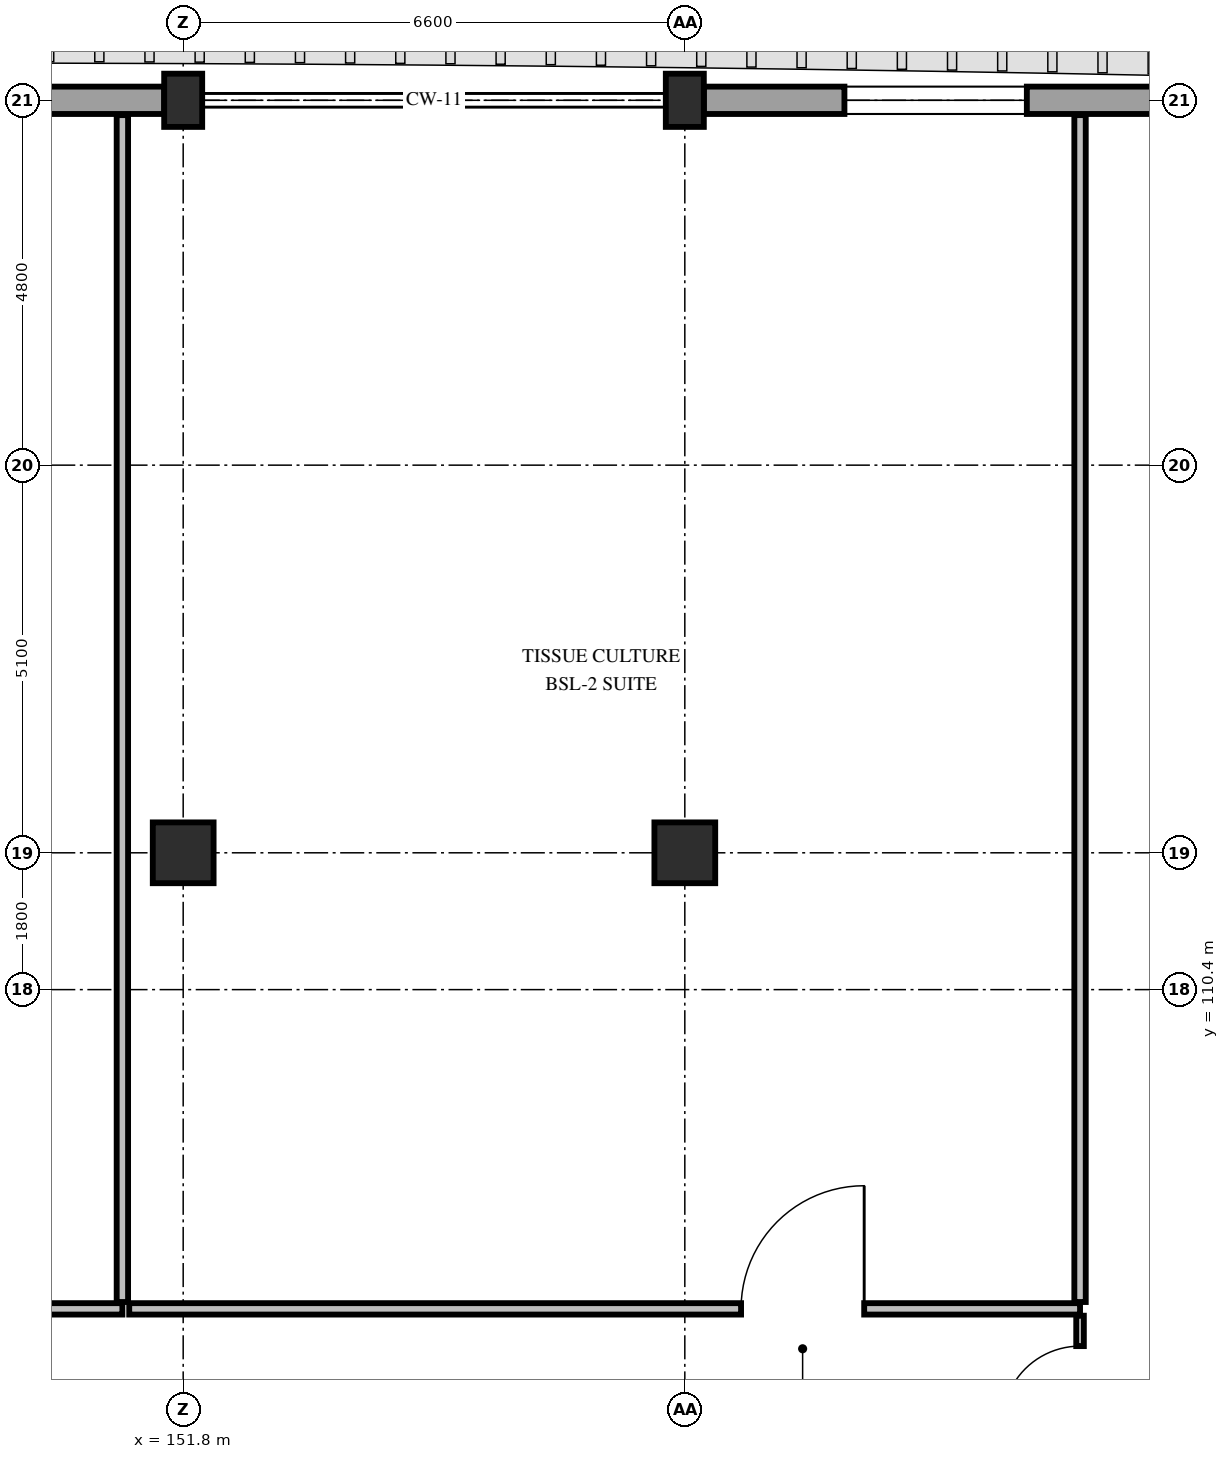
"""IFC4 building model, lengths in metres.
Left out: names, types, materials, properties, quantities, classifications, styles, units other than length and angle.
Written with IfcOpenShell. Run it as: python <this file> out.ifc"""

import sys

from ifc_helpers import new_model, si_unit, direction, frame, frame_2d, origin, origin_2d, place, context, subcontext, project, spatial, rectangle, extrude, element, fill, save


model = new_model("IFC4")
c1 = context("Model", 3, precision=1e-05, world=origin(), true_north=direction((0.0, 1.0)))
c2 = subcontext(c1, "Body", "Model", "MODEL_VIEW")
j1 = project(units=[si_unit("LENGTHUNIT", "METRE"), si_unit("PLANEANGLEUNIT", "RADIAN")], contexts=[c1])
p1 = place(None, origin())
s1 = spatial("IfcSite", under=j1, at=p1, CompositionType="ELEMENT")
p2 = place(p1, origin())
s2 = spatial("IfcBuilding", under=s1, at=p2, CompositionType="ELEMENT")
p3 = place(p2, frame((0.0, 0.0, 5.4)))
s3 = spatial("IfcBuildingStorey", under=s2, at=p3, CompositionType="ELEMENT", Elevation=5.4)
p4 = place(p3, frame((151.8, 112.2, 0.0), z_axis=(0.0, 0.0, 1.0), x_axis=(1.0, 0.0, 0.0)))
e1 = element("IfcColumn", 1, at=p4, inside=s3, PredefinedType="COLUMN", context=c2, shape_type="SweptSolid", body=[
    extrude(rectangle(XDim=0.8, YDim=0.8, at=origin_2d()), origin(), (0.0, 0.0, 1.0), 4.8),
])
p5 = place(p3, frame((151.8, 122.1, 0.0), z_axis=(0.0, 0.0, 1.0), x_axis=(1.0, 0.0, 0.0)))
e2 = element("IfcColumn", 2, at=p5, inside=s3, PredefinedType="PILASTER", context=c2, shape_type="SweptSolid", body=[
    extrude(rectangle(XDim=0.5, YDim=0.7, at=origin_2d()), origin(), (0.0, 0.0, 1.0), 4.8),
])
p6 = place(p3, frame((158.4, 112.2, 0.0), z_axis=(0.0, 0.0, 1.0), x_axis=(1.0, 0.0, 0.0)))
e3 = element("IfcColumn", 3, at=p6, inside=s3, PredefinedType="COLUMN", context=c2, shape_type="SweptSolid", body=[
    extrude(rectangle(XDim=0.8, YDim=0.8, at=origin_2d()), origin(), (0.0, 0.0, 1.0), 4.8),
])
p7 = place(p3, frame((158.4, 122.1, 0.0), z_axis=(0.0, 0.0, 1.0), x_axis=(1.0, 0.0, 0.0)))
e4 = element("IfcColumn", 4, at=p7, inside=s3, PredefinedType="PILASTER", context=c2, shape_type="SweptSolid", body=[
    extrude(rectangle(XDim=0.5, YDim=0.7, at=origin_2d()), origin(), (0.0, 0.0, 1.0), 4.8),
])
p8 = place(p3, frame((145.45, 122.1, 0.0), z_axis=(0.0, 0.0, 1.0), x_axis=(1.0, 0.0, 0.0)))
e5 = element("IfcWall", 5, at=p8, inside=s3, PredefinedType="STANDARD", context=c2, shape_type="SweptSolid", body=[
    extrude(rectangle(XDim=6.1, YDim=0.36, at=frame_2d((3.05, 0.0))), origin(), (0.0, 0.0, 1.0), 3.78),
])
p9 = place(p8, frame((1.85, 0.0, 0.85)))
e6 = element("IfcOpeningElement", 6, at=p9, cuts=e5, PredefinedType="OPENING", context=c2, shape_type="SweptSolid", body=[
    extrude(rectangle(XDim=2.4, YDim=1.88, at=frame_2d((1.2, 0.94))), frame((0.0, 0.195, 0.0), z_axis=(0.0, -1.0, 0.0), x_axis=(1.0, 0.0, 0.0)), (0.0, 0.0, 1.0), 0.39),
])
p10 = place(p3, frame((158.65, 122.1, 0.0), z_axis=(0.0, 0.0, 1.0), x_axis=(1.0, 0.0, 0.0)))
e7 = element("IfcWall", 7, at=p10, inside=s3, PredefinedType="STANDARD", context=c2, shape_type="SweptSolid", body=[
    extrude(rectangle(XDim=6.1, YDim=0.36, at=frame_2d((3.05, 0.0))), origin(), (0.0, 0.0, 1.0), 3.78),
])
p11 = place(p10, frame((1.85, 0.0, 0.85)))
e8 = element("IfcOpeningElement", 8, at=p11, cuts=e7, PredefinedType="OPENING", context=c2, shape_type="SweptSolid", body=[
    extrude(rectangle(XDim=2.4, YDim=1.88, at=frame_2d((1.2, 0.94))), frame((0.0, 0.195, 0.0), z_axis=(0.0, -1.0, 0.0), x_axis=(1.0, 0.0, 0.0)), (0.0, 0.0, 1.0), 0.39),
])
p12 = place(p3, frame((138.69, 106.2, 0.0), z_axis=(0.0, 0.0, 1.0), x_axis=(1.0, 0.0, 0.0)))
e9 = element("IfcWall", 9, at=p12, inside=s3, PredefinedType="PARTITIONING", context=c2, shape_type="SweptSolid", body=[
    extrude(rectangle(XDim=12.31, YDim=0.15, at=frame_2d((6.155, 0.0))), origin(), (0.0, 0.0, 1.0), 3.78),
])
p13 = place(p12, frame((7.31, 0.0, 0.0)))
e10 = element("IfcOpeningElement", 10, at=p13, cuts=e9, PredefinedType="OPENING", context=c2, shape_type="SweptSolid", body=[
    extrude(rectangle(XDim=1.5, YDim=2.25, at=frame_2d((0.75, 1.125))), frame((0.0, 0.09, 0.0), z_axis=(0.0, -1.0, 0.0), x_axis=(1.0, 0.0, 0.0)), (0.0, 0.0, 1.0), 0.18),
])
p14 = place(p3, frame((151.0, 106.29, 0.0), z_axis=(0.0, 0.0, 1.0), x_axis=(0.0, 1.0, 0.0)))
e11 = element("IfcWall", 11, at=p14, inside=s3, PredefinedType="PARTITIONING", context=c2, shape_type="SweptSolid", body=[
    extrude(rectangle(XDim=15.615, YDim=0.15, at=frame_2d((7.808, 0.0))), origin(), (0.0, 0.0, 1.0), 3.93),
])
p15 = place(p3, frame((151.09, 106.2, 0.0), z_axis=(0.0, 0.0, 1.0), x_axis=(1.0, 0.0, 0.0)))
e12 = element("IfcWall", 12, at=p15, inside=s3, PredefinedType="PARTITIONING", context=c2, shape_type="SweptSolid", body=[
    extrude(rectangle(XDim=12.51, YDim=0.15, at=frame_2d((6.255, 0.0))), origin(), (0.0, 0.0, 1.0), 3.78),
])
p16 = place(p15, frame((8.05, 0.0, 0.0)))
e13 = element("IfcOpeningElement", 13, at=p16, cuts=e12, PredefinedType="OPENING", context=c2, shape_type="SweptSolid", body=[
    extrude(rectangle(XDim=1.62, YDim=2.3, at=frame_2d((0.81, 1.15))), frame((0.0, 0.09, 0.0), z_axis=(0.0, -1.0, 0.0), x_axis=(1.0, 0.0, 0.0)), (0.0, 0.0, 1.0), 0.18),
])
p17 = place(p3, frame((163.6, 106.29, 0.0), z_axis=(0.0, 0.0, 1.0), x_axis=(0.0, 1.0, 0.0)))
e14 = element("IfcWall", 14, at=p17, inside=s3, PredefinedType="PARTITIONING", context=c2, shape_type="SweptSolid", body=[
    extrude(rectangle(XDim=15.615, YDim=0.15, at=frame_2d((7.808, 0.0))), origin(), (0.0, 0.0, 1.0), 3.93),
])
p18 = place(p3, frame((163.6, 102.3, 0.0), z_axis=(0.0, 0.0, 1.0), x_axis=(0.0, 1.0, 0.0)))
e15 = element("IfcWall", 15, at=p18, inside=s3, PredefinedType="PARTITIONING", context=c2, shape_type="SweptSolid", body=[
    extrude(rectangle(XDim=3.81, YDim=0.1, at=frame_2d((1.905, 0.0))), origin(), (0.0, 0.0, 1.0), 4.065),
])
p19 = place(p18, frame((2.39, 0.0, 0.0)))
e16 = element("IfcOpeningElement", 16, at=p19, cuts=e15, PredefinedType="OPENING", context=c2, shape_type="SweptSolid", body=[
    extrude(rectangle(XDim=1.02, YDim=2.2, at=frame_2d((0.51, 1.1))), frame((0.0, 0.065, 0.0), z_axis=(0.0, -1.0, 0.0), x_axis=(1.0, 0.0, 0.0)), (0.0, 0.0, 1.0), 0.13),
])
p20 = place(p11, origin())
e17 = element("IfcWindow", 17, at=p20, inside=s3, PartitioningType="DOUBLE_PANEL_VERTICAL", PredefinedType="WINDOW", context=c2, shape_type="SweptSolid", body=[
    extrude(rectangle(XDim=2.4, YDim=1.88, at=frame_2d((1.2, 0.94))), frame((0.0, 0.03, 0.0), z_axis=(0.0, -1.0, 0.0), x_axis=(1.0, 0.0, 0.0)), (0.0, 0.0, 1.0), 0.06),
])
fill(e8, e17)
p21 = place(p16, origin())
e18 = element("IfcDoor", 18, at=p21, inside=s3, OperationType="SINGLE_SWING_RIGHT", PredefinedType="DOOR", context=c2, shape_type="SweptSolid", body=[
    extrude(rectangle(XDim=1.62, YDim=2.3, at=frame_2d((0.81, 1.15))), frame((0.0, 0.025, 0.0), z_axis=(0.0, -1.0, 0.0), x_axis=(1.0, 0.0, 0.0)), (0.0, 0.0, 1.0), 0.05),
])
fill(e13, e18)
p22 = place(p19, origin())
e19 = element("IfcDoor", 19, at=p22, inside=s3, OperationType="SINGLE_SWING_LEFT", PredefinedType="DOOR", context=c2, shape_type="SweptSolid", body=[
    extrude(rectangle(XDim=1.02, YDim=2.2, at=frame_2d((0.51, 1.1))), frame((0.0, 0.025, 0.0), z_axis=(0.0, -1.0, 0.0), x_axis=(1.0, 0.0, 0.0)), (0.0, 0.0, 1.0), 0.05),
])
fill(e16, e19)
save(model, sys.argv[1])
